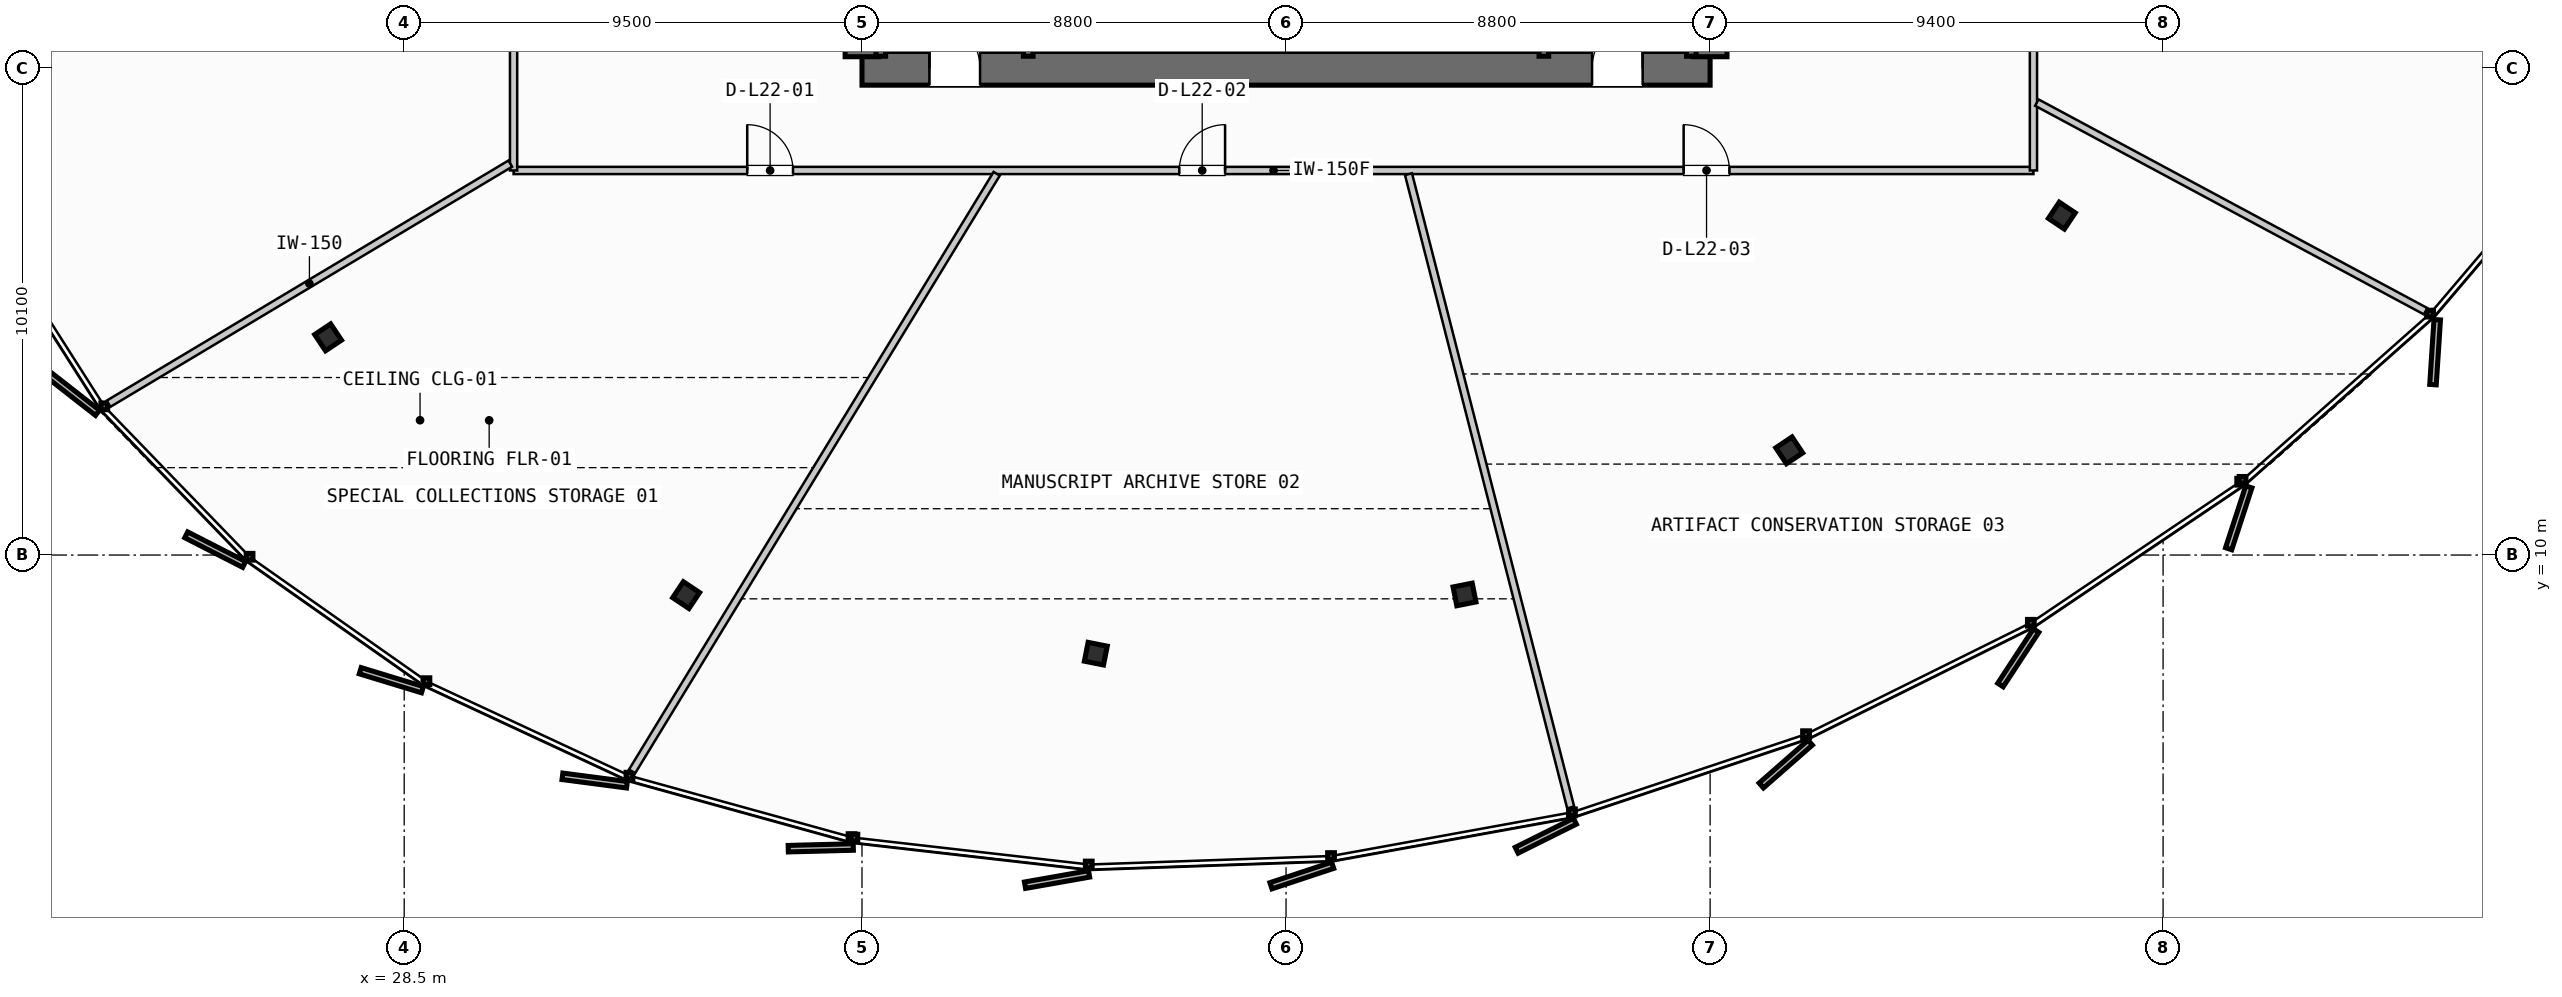
"""IFC4 building model, lengths in metres.
Left out: names, types, materials, properties, quantities, classifications, styles, units other than length and angle.
Written with IfcOpenShell. Run it as: python <this file> out.ifc"""

import sys

from ifc_helpers import new_model, si_unit, direction, frame, frame_2d, origin, origin_2d, place, context, subcontext, project, spatial, rectangle, i_section, extrude, source, transform, mapped, element, fill, save


model = new_model("IFC4")
c1 = context("Model", 3, precision=1e-05, world=origin(), true_north=direction((0.0, 1.0)))
c2 = subcontext(c1, "Body", "Model", "MODEL_VIEW")
j1 = project(units=[si_unit("LENGTHUNIT", "METRE"), si_unit("PLANEANGLEUNIT", "RADIAN")], contexts=[c1])
p1 = place(None, origin())
s1 = spatial("IfcSite", under=j1, at=p1, CompositionType="ELEMENT")
p2 = place(p1, origin())
s2 = spatial("IfcBuilding", under=s1, at=p2, CompositionType="ELEMENT")
p3 = place(p2, frame((0.0, 0.0, 92.8)))
s3 = spatial("IfcBuildingStorey", under=s2, at=p3, CompositionType="ELEMENT", Elevation=92.8)
p4 = place(p3, frame((38.0, 20.1, 0.0), z_axis=(0.0, 0.0, 1.0), x_axis=(1.0, 0.0, 0.0)))
e1 = element("IfcWall", 1, at=p4, inside=s3, PredefinedType="SHEAR", context=c2, shape_type="SweptSolid", body=[
    extrude(rectangle(XDim=17.6, YDim=0.7, at=frame_2d((8.8, 0.0))), origin(), (0.0, 0.0, 1.0), 3.35),
])
p5 = place(p4, frame((1.4, 0.0, 0.0)))
e2 = element("IfcOpeningElement", 2, at=p5, cuts=e1, PredefinedType="OPENING", context=c2, shape_type="SweptSolid", body=[
    extrude(rectangle(XDim=1.05, YDim=2.15, at=frame_2d((0.525, 1.075))), frame((0.0, 0.36, 0.0), z_axis=(0.0, -1.0, 0.0), x_axis=(1.0, 0.0, 0.0)), (0.0, 0.0, 1.0), 0.72),
])
p6 = place(p4, frame((15.15, 0.0, 0.0)))
e3 = element("IfcOpeningElement", 3, at=p6, cuts=e1, PredefinedType="OPENING", context=c2, shape_type="SweptSolid", body=[
    extrude(rectangle(XDim=1.05, YDim=2.15, at=frame_2d((0.525, 1.075))), frame((0.0, 0.36, 0.0), z_axis=(0.0, -1.0, 0.0), x_axis=(1.0, 0.0, 0.0)), (0.0, 0.0, 1.0), 0.72),
])
p7 = place(p3, frame((38.0, 35.26, 0.0), z_axis=(0.0, 0.0, 1.0), x_axis=(0.0, -1.0, 0.0)))
e4 = element("IfcWall", 4, at=p7, inside=s3, PredefinedType="SHEAR", context=c2, shape_type="SweptSolid", body=[
    extrude(rectangle(XDim=14.92, YDim=0.7, at=frame_2d((7.46, 0.0))), origin(), (0.0, 0.0, 1.0), 3.35),
])
p8 = place(p7, frame((5.21, 0.0, 0.0)))
e5 = element("IfcOpeningElement", 5, at=p8, cuts=e4, PredefinedType="OPENING", context=c2, shape_type="SweptSolid", body=[
    extrude(rectangle(XDim=1.1, YDim=2.2, at=frame_2d((0.55, 1.1))), frame((0.0, 0.36, 0.0), z_axis=(0.0, -1.0, 0.0), x_axis=(1.0, 0.0, 0.0)), (0.0, 0.0, 1.0), 0.72),
])
p9 = place(p3, frame((55.6, 20.34, 0.0), z_axis=(0.0, 0.0, 1.0), x_axis=(0.0, 1.0, 0.0)))
e6 = element("IfcWall", 6, at=p9, inside=s3, PredefinedType="SHEAR", context=c2, shape_type="SweptSolid", body=[
    extrude(rectangle(XDim=14.92, YDim=0.7, at=frame_2d((7.46, 0.0))), origin(), (0.0, 0.0, 1.0), 3.35),
])
p10 = place(p9, frame((12.71, 0.0, 0.0)))
e7 = element("IfcOpeningElement", 7, at=p10, cuts=e6, PredefinedType="OPENING", context=c2, shape_type="SweptSolid", body=[
    extrude(rectangle(XDim=1.05, YDim=2.15, at=frame_2d((0.525, 1.075))), frame((0.0, 0.36, 0.0), z_axis=(0.0, -1.0, 0.0), x_axis=(1.0, 0.0, 0.0)), (0.0, 0.0, 1.0), 0.72),
])
p11 = place(p9, frame((8.61, 0.0, 0.0)))
e8 = element("IfcOpeningElement", 8, at=p11, cuts=e6, PredefinedType="OPENING", context=c2, shape_type="SweptSolid", body=[
    extrude(rectangle(XDim=1.1, YDim=2.2, at=frame_2d((0.55, 1.1))), frame((0.0, 0.36, 0.0), z_axis=(0.0, -1.0, 0.0), x_axis=(1.0, 0.0, 0.0)), (0.0, 0.0, 1.0), 0.72),
])
m1 = source(origin(), c2, "Body", "SweptSolid", [
    extrude(i_section(OverallWidth=0.405, OverallDepth=0.398, WebThickness=0.035, FlangeThickness=0.056, FilletRadius=0.015, at=origin_2d()), origin(), (0.0, 0.0, 1.0), 3.35),
])
for number, where, z_axis, x_axis in (
    (9, (26.921, 14.517, 0.0), (0.0, 0.0, 1.0), (-0.831, -0.556, 0.0)),
    (10, (34.351, 9.168, 0.0), (0.0, 0.0, 1.0), (-0.556, -0.831, 0.0)),
    (11, (42.852, 7.954, 0.0), (0.0, 0.0, 1.0), (-0.195, -0.981, 0.0)),
    (12, (50.503, 9.182, 0.0), (0.0, 0.0, 1.0), (0.195, -0.981, 0.0)),
    (13, (57.242, 12.172, 0.0), (0.0, 0.0, 1.0), (0.556, -0.831, 0.0)),
    (14, (62.899, 17.043, 0.0), (0.0, 0.0, 1.0), (0.831, -0.556, 0.0)),
):
    element("IfcColumn", number, at=place(p3, frame(where, z_axis=z_axis, x_axis=x_axis)), inside=s3, PredefinedType="COLUMN", context=c2, shape_type="MappedRepresentation", body=[
        mapped(m1, transform((0.0, 0.0, 0.0), scale=1.0)),
    ])
for number, where, z_axis, x_axis in (
    (15, (41.45, 27.7, 0.0), (0.0, 0.0, 1.0), (0.0, -1.0, 0.0)),
    (16, (38.39, 20.35, 0.0), (0.0, 0.0, 1.0), (0.0, 1.0, 0.0)),
    (17, (55.21, 27.7, 0.0), (0.0, 0.0, 1.0), (0.0, -1.0, 0.0)),
    (18, (52.15, 20.35, 0.0), (0.0, 0.0, 1.0), (0.0, 1.0, 0.0)),
):
    element("IfcWall", number, at=place(p3, frame(where, z_axis=z_axis, x_axis=x_axis)), inside=s3, PredefinedType="SHEAR", context=c2, shape_type="SweptSolid", body=[
        extrude(rectangle(XDim=7.35, YDim=0.2, at=frame_2d((3.675, 0.0))), origin(), (0.0, 0.0, 1.0), 3.35),
    ])
p12 = place(p3, frame((30.77, 17.98, 0.0), z_axis=(0.0, 0.0, 1.0), x_axis=(1.0, 0.0, 0.0)))
e19 = element("IfcWall", 19, at=p12, inside=s3, PredefinedType="PARTITIONING", context=c2, shape_type="SweptSolid", body=[
    extrude(rectangle(XDim=31.54, YDim=0.15, at=frame_2d((15.77, 0.0))), origin(), (0.0, 0.0, 1.0), 2.28),
])
p13 = place(p12, frame((4.848, 0.0, 0.0)))
e20 = element("IfcOpeningElement", 20, at=p13, cuts=e19, PredefinedType="OPENING", context=c2, shape_type="SweptSolid", body=[
    extrude(rectangle(XDim=0.95, YDim=2.15, at=frame_2d((0.475, 1.075))), frame((0.0, 0.085, 0.0), z_axis=(0.0, -1.0, 0.0), x_axis=(1.0, 0.0, 0.0)), (0.0, 0.0, 1.0), 0.17),
])
p14 = place(p12, frame((13.815, 0.0, 0.0)))
e21 = element("IfcOpeningElement", 21, at=p14, cuts=e19, PredefinedType="OPENING", context=c2, shape_type="SweptSolid", body=[
    extrude(rectangle(XDim=0.95, YDim=2.15, at=frame_2d((0.475, 1.075))), frame((0.0, 0.085, 0.0), z_axis=(0.0, -1.0, 0.0), x_axis=(1.0, 0.0, 0.0)), (0.0, 0.0, 1.0), 0.17),
])
p15 = place(p12, frame((24.281, 0.0, 0.0)))
e22 = element("IfcOpeningElement", 22, at=p15, cuts=e19, PredefinedType="OPENING", context=c2, shape_type="SweptSolid", body=[
    extrude(rectangle(XDim=0.95, YDim=2.15, at=frame_2d((0.475, 1.075))), frame((0.0, 0.085, 0.0), z_axis=(0.0, -1.0, 0.0), x_axis=(1.0, 0.0, 0.0)), (0.0, 0.0, 1.0), 0.17),
])
p16 = place(p3, frame((62.31, 17.98, 0.0), z_axis=(0.0, 0.0, 1.0), x_axis=(0.0, 1.0, 0.0)))
e23 = element("IfcWall", 23, at=p16, inside=s3, PredefinedType="PARTITIONING", context=c2, shape_type="SweptSolid", body=[
    extrude(rectangle(XDim=20.06, YDim=0.15, at=frame_2d((10.03, 0.0))), origin(), (0.0, 0.0, 1.0), 2.28),
])
p17 = place(p16, frame((5.033, 0.0, 0.0)))
e24 = element("IfcOpeningElement", 24, at=p17, cuts=e23, PredefinedType="OPENING", context=c2, shape_type="SweptSolid", body=[
    extrude(rectangle(XDim=0.95, YDim=2.15, at=frame_2d((0.475, 1.075))), frame((0.0, 0.085, 0.0), z_axis=(0.0, -1.0, 0.0), x_axis=(1.0, 0.0, 0.0)), (0.0, 0.0, 1.0), 0.17),
])
p18 = place(p16, frame((13.662, 0.0, 0.0)))
e25 = element("IfcOpeningElement", 25, at=p18, cuts=e23, PredefinedType="OPENING", context=c2, shape_type="SweptSolid", body=[
    extrude(rectangle(XDim=0.95, YDim=2.15, at=frame_2d((0.475, 1.075))), frame((0.0, 0.085, 0.0), z_axis=(0.0, -1.0, 0.0), x_axis=(1.0, 0.0, 0.0)), (0.0, 0.0, 1.0), 0.17),
])
p19 = place(p3, frame((30.77, 38.04, 0.0), z_axis=(0.0, 0.0, 1.0), x_axis=(0.0, -1.0, 0.0)))
e26 = element("IfcWall", 26, at=p19, inside=s3, PredefinedType="PARTITIONING", context=c2, shape_type="SweptSolid", body=[
    extrude(rectangle(XDim=20.06, YDim=0.15, at=frame_2d((10.03, 0.0))), origin(), (0.0, 0.0, 1.0), 2.28),
])
p20 = place(p19, frame((9.749, 0.0, 0.0)))
e27 = element("IfcOpeningElement", 27, at=p20, cuts=e26, PredefinedType="OPENING", context=c2, shape_type="SweptSolid", body=[
    extrude(rectangle(XDim=0.95, YDim=2.15, at=frame_2d((0.475, 1.075))), frame((0.0, 0.085, 0.0), z_axis=(0.0, -1.0, 0.0), x_axis=(1.0, 0.0, 0.0)), (0.0, 0.0, 1.0), 0.17),
])
p21 = place(p3, frame((30.701, 18.122, 0.0), z_axis=(0.0, 0.0, 1.0), x_axis=(-0.85839444225, -0.512990235301, 0.0)))
e28 = element("IfcWall", 28, at=p21, inside=s3, PredefinedType="PARTITIONING", context=c2, shape_type="SweptSolid", body=[
    extrude(rectangle(XDim=9.711, YDim=0.15, at=frame_2d((4.855, 0.0))), origin(), (0.0, 0.0, 1.0), 2.28),
])
p22 = place(p3, frame((40.795, 17.912, 0.0), z_axis=(0.0, 0.0, 1.0), x_axis=(-0.520867966823, -0.853637253836, 0.0)))
e29 = element("IfcWall", 29, at=p22, inside=s3, PredefinedType="PARTITIONING", context=c2, shape_type="SweptSolid", body=[
    extrude(rectangle(XDim=14.527, YDim=0.15, at=frame_2d((7.263, 0.0))), origin(), (0.0, 0.0, 1.0), 2.28),
])
p23 = place(p3, frame((49.341, 17.903, 0.0), z_axis=(0.0, 0.0, 1.0), x_axis=(0.248100788848, -0.968734224941, 0.0)))
e30 = element("IfcWall", 30, at=p23, inside=s3, PredefinedType="PARTITIONING", context=c2, shape_type="SweptSolid", body=[
    extrude(rectangle(XDim=13.564, YDim=0.15, at=frame_2d((6.782, 0.0))), origin(), (0.0, 0.0, 1.0), 2.28),
])
p24 = place(p3, frame((62.381, 19.388, 0.0), z_axis=(0.0, 0.0, 1.0), x_axis=(0.881148345104, -0.472839924204, 0.0)))
e31 = element("IfcWall", 31, at=p24, inside=s3, PredefinedType="PARTITIONING", context=c2, shape_type="SweptSolid", body=[
    extrude(rectangle(XDim=9.156, YDim=0.15, at=frame_2d((4.578, 0.0))), origin(), (0.0, 0.0, 1.0), 2.28),
])
m2 = source(origin(), c2, "Body", "SweptSolid", [
    extrude(rectangle(XDim=1.05, YDim=2.15, at=frame_2d((0.525, 1.075))), frame((0.0, 0.025, 0.0), z_axis=(0.0, -1.0, 0.0), x_axis=(1.0, 0.0, 0.0)), (0.0, 0.0, 1.0), 0.05),
])
p25 = place(p5, origin())
e32 = element("IfcDoor", 32, at=p25, inside=s3, OperationType="SINGLE_SWING_LEFT", PredefinedType="DOOR", context=c2, shape_type="MappedRepresentation", body=[
    mapped(m2, transform((0.0, 0.0, 0.0), scale=1.0)),
])
fill(e2, e32)
p26 = place(p6, origin())
e33 = element("IfcDoor", 33, at=p26, inside=s3, OperationType="SINGLE_SWING_RIGHT", PredefinedType="DOOR", context=c2, shape_type="MappedRepresentation", body=[
    mapped(m2, transform((0.0, 0.0, 0.0), scale=1.0)),
])
fill(e3, e33)
m3 = source(origin(), c2, "Body", "SweptSolid", [
    extrude(rectangle(XDim=0.95, YDim=2.15, at=frame_2d((0.475, 1.075))), frame((0.0, 0.025, 0.0), z_axis=(0.0, -1.0, 0.0), x_axis=(1.0, 0.0, 0.0)), (0.0, 0.0, 1.0), 0.05),
])
p27 = place(p13, origin())
e34 = element("IfcDoor", 34, at=p27, inside=s3, OperationType="SINGLE_SWING_LEFT", PredefinedType="DOOR", context=c2, shape_type="MappedRepresentation", body=[
    mapped(m3, transform((0.0, 0.0, 0.0), scale=1.0)),
])
fill(e20, e34)
p28 = place(p14, origin())
e35 = element("IfcDoor", 35, at=p28, inside=s3, OperationType="SINGLE_SWING_RIGHT", PredefinedType="DOOR", context=c2, shape_type="MappedRepresentation", body=[
    mapped(m3, transform((0.0, 0.0, 0.0), scale=1.0)),
])
fill(e21, e35)
p29 = place(p15, origin())
e36 = element("IfcDoor", 36, at=p29, inside=s3, OperationType="SINGLE_SWING_LEFT", PredefinedType="DOOR", context=c2, shape_type="MappedRepresentation", body=[
    mapped(m3, transform((0.0, 0.0, 0.0), scale=1.0)),
])
fill(e22, e36)
save(model, sys.argv[1])
